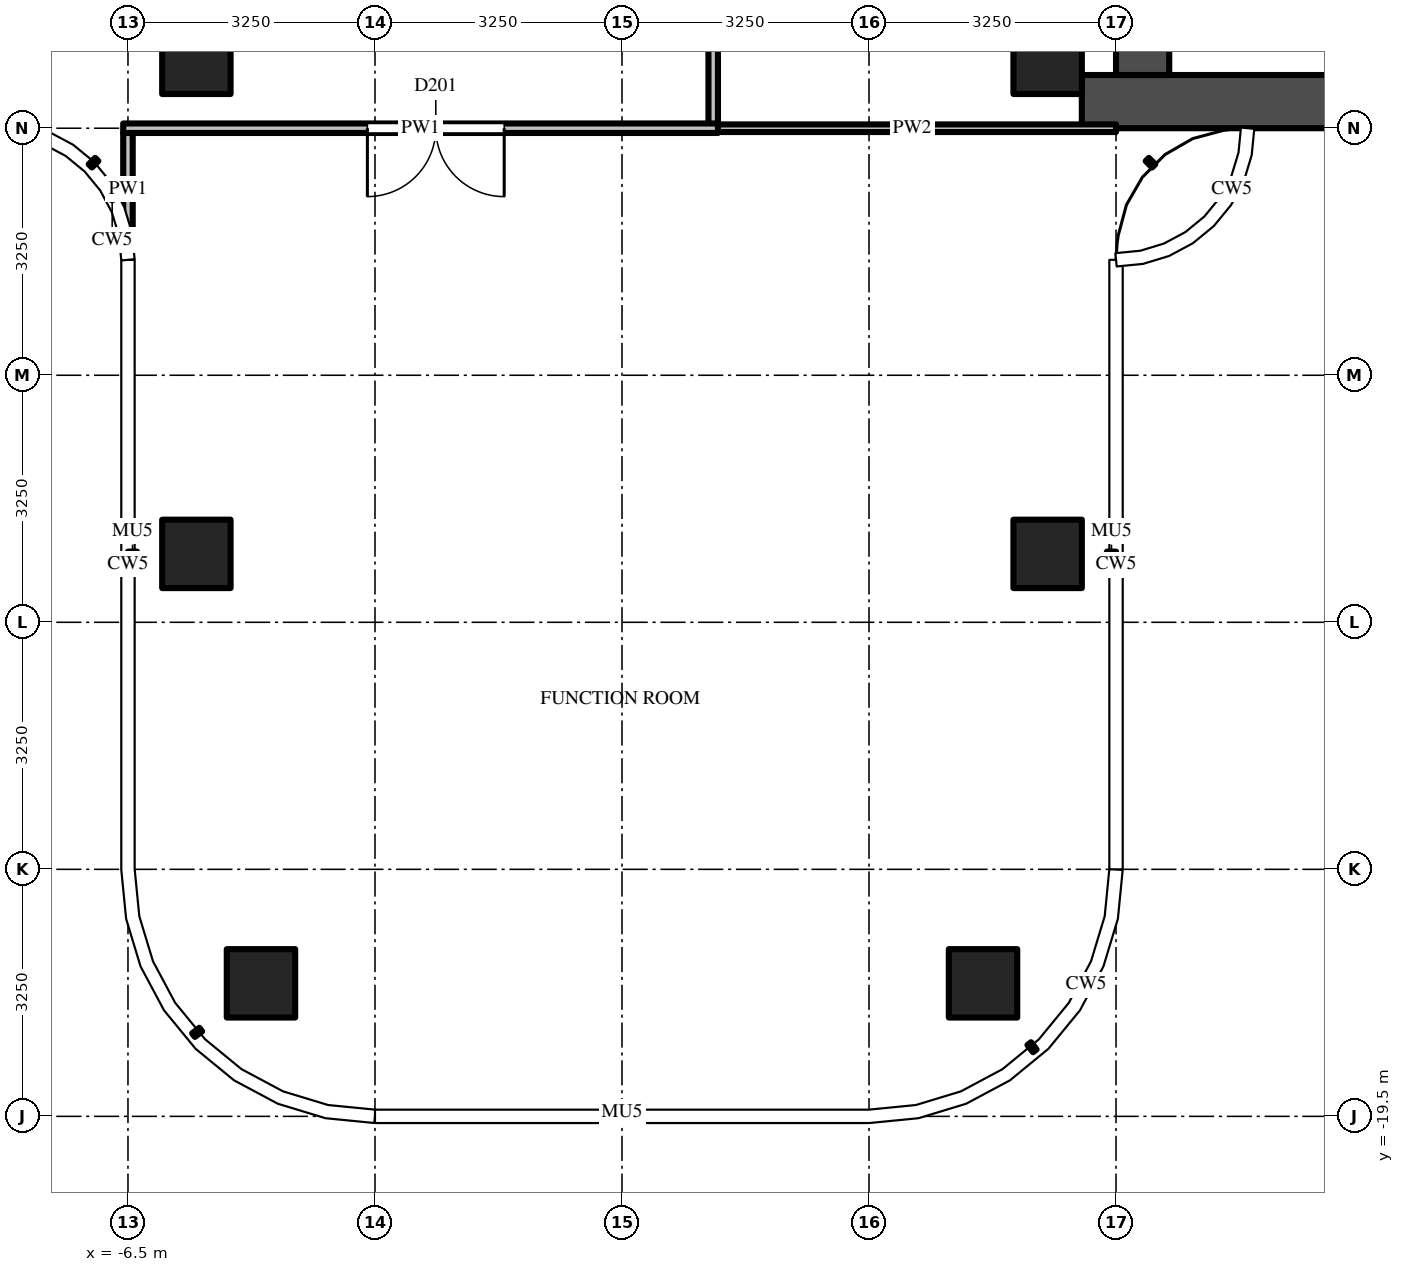
"""IFC4 building model, lengths in metres.
Left out: names, types, materials, properties, quantities, classifications, styles, units other than length and angle.
Written with IfcOpenShell. Run it as: python <this file> out.ifc"""

import sys

from ifc_helpers import new_model, si_unit, direction, frame, frame_2d, origin, origin_2d, place, context, subcontext, project, spatial, rectangle, extrude, source, transform, mapped, element, fill, save


model = new_model("IFC4")
c1 = context("Model", 3, precision=1e-05, world=origin(), true_north=direction((0.0, 1.0)))
c2 = subcontext(c1, "Body", "Model", "MODEL_VIEW")
j1 = project(units=[si_unit("LENGTHUNIT", "METRE"), si_unit("PLANEANGLEUNIT", "RADIAN")], contexts=[c1])
p1 = place(None, origin())
s1 = spatial("IfcSite", under=j1, at=p1, CompositionType="ELEMENT")
p2 = place(p1, origin())
s2 = spatial("IfcBuilding", under=s1, at=p2, CompositionType="ELEMENT")
p3 = place(p2, frame((0.0, 0.0, 342.1)))
s3 = spatial("IfcBuildingStorey", under=s2, at=p3, CompositionType="ELEMENT", Elevation=342.1)
m1 = source(origin(), c2, "Body", "SweptSolid", [
    extrude(rectangle(XDim=0.9, YDim=0.9, at=origin_2d()), origin(), (0.0, 0.0, 1.0), 4.0),
])
for number, where, z_axis, x_axis in (
    (1, (5.6, -5.6, 0.0), (0.0, 0.0, 1.0), (1.0, 0.0, 0.0)),
    (2, (-5.6, -5.6, 0.0), (0.0, 0.0, 1.0), (1.0, 0.0, 0.0)),
    (3, (5.6, -12.1, 0.0), (0.0, 0.0, 1.0), (1.0, 0.0, 0.0)),
    (4, (4.75, -17.75, 0.0), (0.0, 0.0, 1.0), (1.0, 0.0, 0.0)),
    (5, (-5.6, -12.1, 0.0), (0.0, 0.0, 1.0), (1.0, 0.0, 0.0)),
    (6, (-4.75, -17.75, 0.0), (0.0, 0.0, 1.0), (1.0, 0.0, 0.0)),
):
    element("IfcColumn", number, at=place(p3, frame(where, z_axis=z_axis, x_axis=x_axis)), inside=s3, PredefinedType="COLUMN", context=c2, shape_type="MappedRepresentation", body=[
        mapped(m1, transform((0.0, 0.0, 0.0))),
    ])
m2 = source(origin(), c2, "Body", "SweptSolid", [
    extrude(rectangle(XDim=16.7, YDim=0.7, at=frame_2d((8.35, 0.0))), origin(), (0.0, 0.0, 1.0), 3.75),
])
p4 = place(p3, frame((6.05, -6.15, 0.0), z_axis=(0.0, 0.0, 1.0), x_axis=(1.0, 0.0, 0.0)))
e7 = element("IfcWall", 7, at=p4, inside=s3, PredefinedType="SHEAR", context=c2, shape_type="MappedRepresentation", body=[
    mapped(m2, transform((0.0, 0.0, 0.0))),
])
m3 = source(origin(), c2, "Body", "SweptSolid", [
    extrude(rectangle(XDim=9.05, YDim=0.7, at=frame_2d((4.525, 0.0))), origin(), (0.0, 0.0, 1.0), 3.75),
])
p5 = place(p3, frame((6.85, -5.8, 0.0), z_axis=(0.0, 0.0, 1.0), x_axis=(0.0, 1.0, 0.0)))
e8 = element("IfcWall", 8, at=p5, inside=s3, PredefinedType="SHEAR", context=c2, shape_type="MappedRepresentation", body=[
    mapped(m3, transform((0.0, 0.0, 0.0))),
])
m4 = source(origin(), c2, "Body", "SweptSolid", [
    extrude(rectangle(XDim=1.8, YDim=2.1, at=frame_2d((0.9, 1.05))), frame((0.0, 0.36, 0.0), z_axis=(0.0, -1.0, 0.0), x_axis=(1.0, 0.0, 0.0)), (0.0, 0.0, 1.0), 0.72),
])
p6 = place(p5, frame((3.15, 0.0, 0.0)))
e9 = element("IfcOpeningElement", 9, at=p6, cuts=e8, PredefinedType="OPENING", context=c2, shape_type="MappedRepresentation", body=[
    mapped(m4, transform((0.0, 0.0, 0.0))),
])
m5 = source(origin(), c2, "Body", "SweptSolid", [
    extrude(rectangle(XDim=1.469, YDim=0.125, at=frame_2d((0.734, 0.0))), origin(), (0.0, 0.0, 1.0), 3.75),
])
p7 = place(p3, frame((-6.5, -6.562, 0.0), z_axis=(0.0, 0.0, 1.0), x_axis=(0.0, -1.0, 0.0)))
e10 = element("IfcWall", 10, at=p7, inside=s3, PredefinedType="PARTITIONING", context=c2, shape_type="MappedRepresentation", body=[
    mapped(m5, transform((0.0, 0.0, 0.0))),
])
m6 = source(origin(), c2, "Body", "SweptSolid", [
    extrude(rectangle(XDim=3.137, YDim=0.125, at=frame_2d((1.569, 0.0))), origin(), (0.0, 0.0, 1.0), 3.046),
])
p8 = place(p3, frame((1.2, -3.312, 0.0), z_axis=(0.0, 0.0, 1.0), x_axis=(0.0, -1.0, 0.0)))
e11 = element("IfcWall", 11, at=p8, inside=s3, PredefinedType="PARTITIONING", context=c2, shape_type="MappedRepresentation", body=[
    mapped(m6, transform((0.0, 0.0, 0.0))),
])
m7 = source(origin(), c2, "Body", "SweptSolid", [
    extrude(rectangle(XDim=5.363, YDim=0.1, at=frame_2d((2.681, 0.0))), origin(), (0.0, 0.0, 1.0), 2.83),
])
p9 = place(p3, frame((1.137, -6.5, 0.0), z_axis=(0.0, 0.0, 1.0), x_axis=(1.0, 0.0, 0.0)))
e12 = element("IfcWall", 12, at=p9, inside=s3, PredefinedType="PARTITIONING", context=c2, shape_type="MappedRepresentation", body=[
    mapped(m7, transform((0.0, 0.0, 0.0))),
])
m8 = source(origin(), c2, "Body", "SweptSolid", [
    extrude(rectangle(XDim=7.825, YDim=0.125, at=frame_2d((3.913, 0.0))), origin(), (0.0, 0.0, 1.0), 2.83),
])
p10 = place(p3, frame((1.262, -6.5, 0.0), z_axis=(0.0, 0.0, 1.0), x_axis=(-1.0, 0.0, 0.0)))
e13 = element("IfcWall", 13, at=p10, inside=s3, PredefinedType="PARTITIONING", context=c2, shape_type="MappedRepresentation", body=[
    mapped(m8, transform((0.0, 0.0, 0.0))),
])
m9 = source(origin(), c2, "Body", "SweptSolid", [
    extrude(rectangle(XDim=1.8, YDim=2.1, at=frame_2d((0.9, 1.05))), frame((0.0, 0.073, 0.0), z_axis=(0.0, -1.0, 0.0), x_axis=(1.0, 0.0, 0.0)), (0.0, 0.0, 1.0), 0.145),
])
p11 = place(p10, frame((2.812, 0.0, 0.0)))
e14 = element("IfcOpeningElement", 14, at=p11, cuts=e13, PredefinedType="OPENING", context=c2, shape_type="MappedRepresentation", body=[
    mapped(m9, transform((0.0, 0.0, 0.0))),
])
m10 = source(origin(), c2, "Body", "SweptSolid", [
    extrude(rectangle(XDim=1.8, YDim=2.1, at=frame_2d((0.9, 1.05))), frame((0.0, 0.025, 0.0), z_axis=(0.0, -1.0, 0.0), x_axis=(1.0, 0.0, 0.0)), (0.0, 0.0, 1.0), 0.05),
])
p12 = place(p11, origin())
e15 = element("IfcDoor", 15, at=p12, inside=s3, OperationType="DOUBLE_DOOR_SINGLE_SWING", PredefinedType="DOOR", context=c2, shape_type="MappedRepresentation", body=[
    mapped(m10, transform((0.0, 0.0, 0.0))),
])
fill(e14, e15)
save(model, sys.argv[1])
